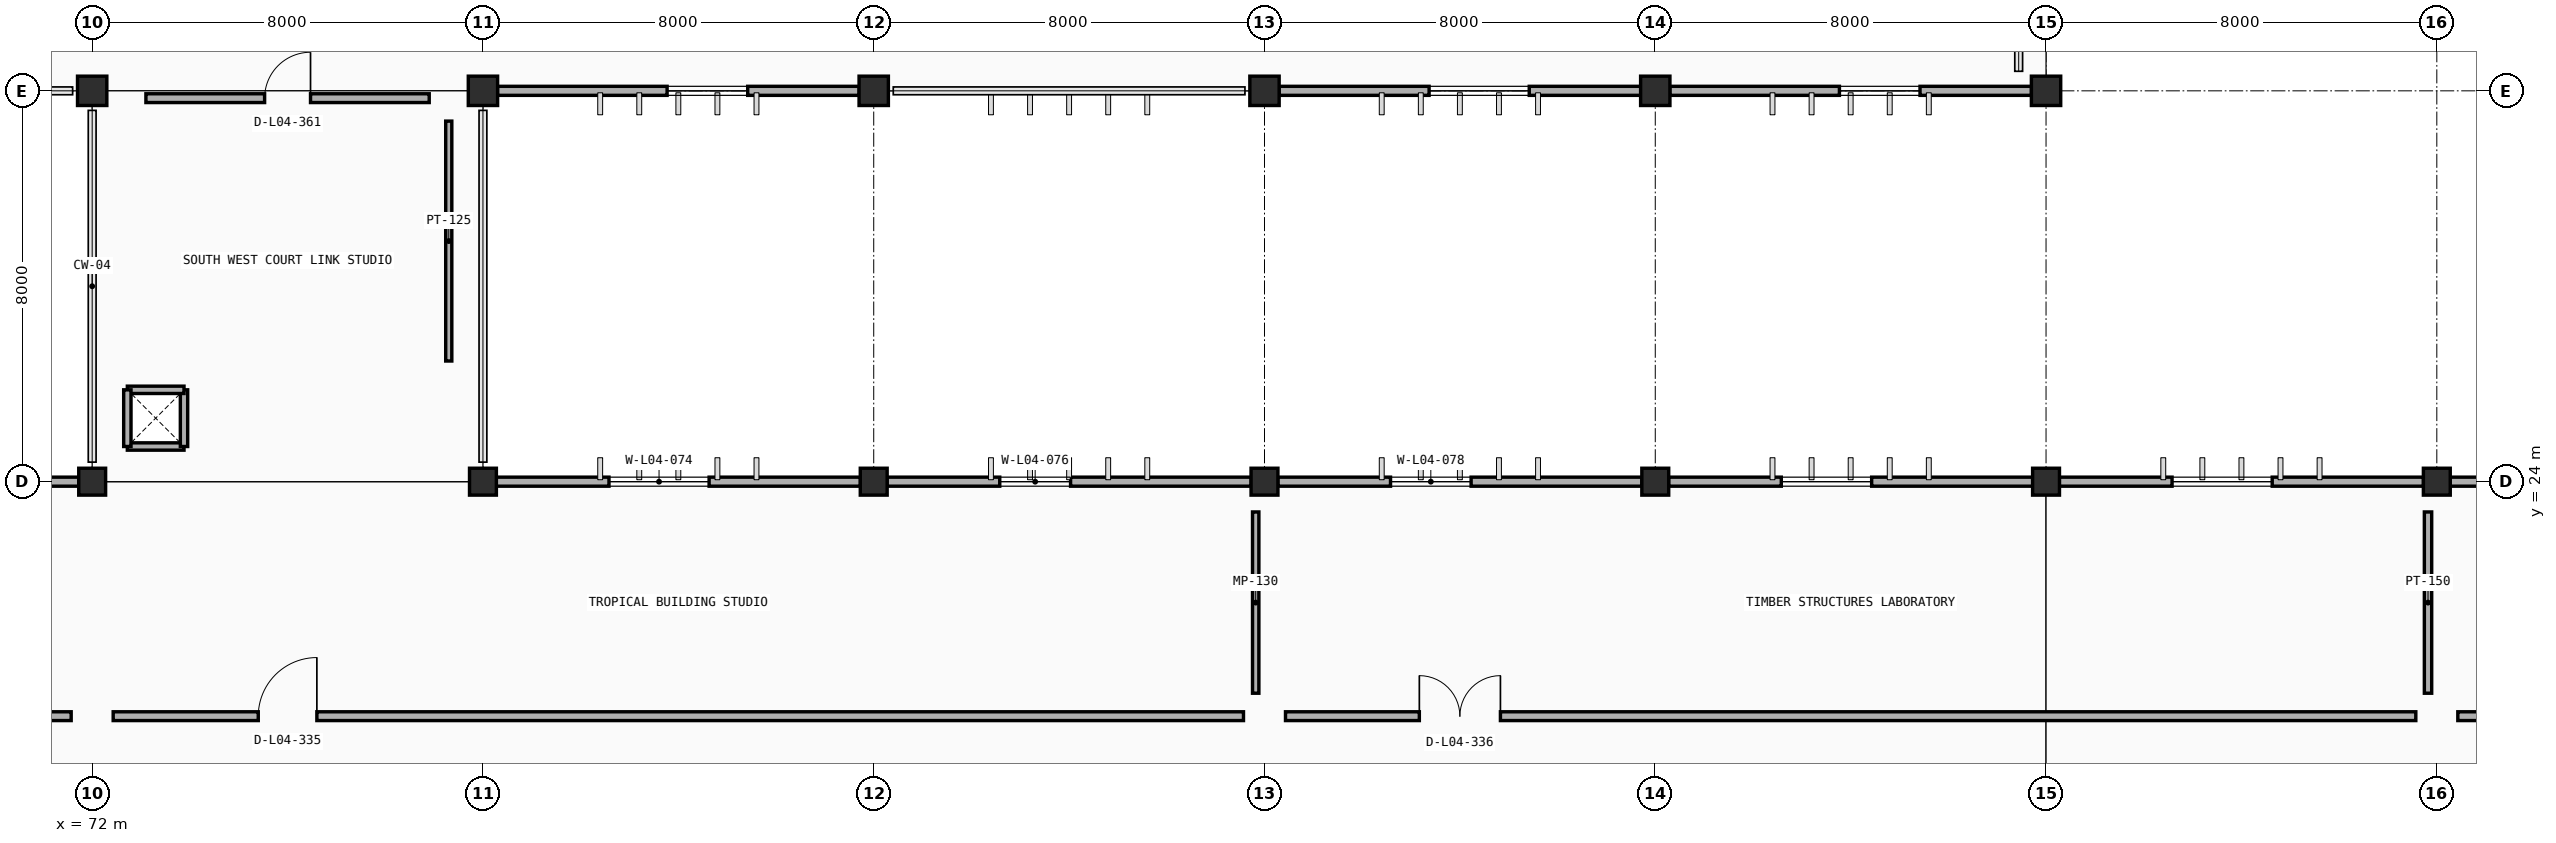
"""IFC4 building model, lengths in metres.
Left out: names, types, materials, properties, quantities, classifications, styles, units other than length and angle.
Written with IfcOpenShell. Run it as: python <this file> out.ifc"""

import sys

from ifc_helpers import new_model, si_unit, direction, frame, frame_2d, origin, origin_2d, place, context, subcontext, project, spatial, rectangle, extrude, element, fill, save


model = new_model("IFC4")
c1 = context("Model", 3, precision=1e-05, world=origin(), true_north=direction((0.0, 1.0)))
c2 = subcontext(c1, "Body", "Model", "MODEL_VIEW")
j1 = project(units=[si_unit("LENGTHUNIT", "METRE"), si_unit("PLANEANGLEUNIT", "RADIAN")], contexts=[c1])
p1 = place(None, origin())
s1 = spatial("IfcSite", under=j1, at=p1, CompositionType="ELEMENT")
p2 = place(p1, origin())
s2 = spatial("IfcBuilding", under=s1, at=p2, CompositionType="ELEMENT")
p3 = place(p2, frame((0.0, 0.0, 13.8)))
s3 = spatial("IfcBuildingStorey", under=s2, at=p3, CompositionType="ELEMENT", Elevation=13.8)
for number, where, z_axis, x_axis in (
    (1, (72.0, 24.0, 0.0), (0.0, 0.0, 1.0), (1.0, 0.0, 0.0)),
    (2, (80.0, 24.0, 0.0), (0.0, 0.0, 1.0), (1.0, 0.0, 0.0)),
    (3, (88.0, 24.0, 0.0), (0.0, 0.0, 1.0), (1.0, 0.0, 0.0)),
    (4, (96.0, 24.0, 0.0), (0.0, 0.0, 1.0), (1.0, 0.0, 0.0)),
    (5, (104.0, 24.0, 0.0), (0.0, 0.0, 1.0), (1.0, 0.0, 0.0)),
    (6, (112.0, 24.0, 0.0), (0.0, 0.0, 1.0), (1.0, 0.0, 0.0)),
    (7, (120.0, 24.0, 0.0), (0.0, 0.0, 1.0), (1.0, 0.0, 0.0)),
):
    element("IfcColumn", number, at=place(p3, frame(where, z_axis=z_axis, x_axis=x_axis)), inside=s3, PredefinedType="COLUMN", context=c2, shape_type="SweptSolid", body=[
        extrude(rectangle(XDim=0.55, YDim=0.55, at=origin_2d()), origin(), (0.0, 0.0, 1.0), 4.2),
    ])
for number, where, z_axis, x_axis in (
    (8, (72.0, 32.0, 0.0), (0.0, 0.0, 1.0), (1.0, 0.0, 0.0)),
    (9, (80.0, 32.0, 0.0), (0.0, 0.0, 1.0), (1.0, 0.0, 0.0)),
    (10, (88.0, 32.0, 0.0), (0.0, 0.0, 1.0), (1.0, 0.0, 0.0)),
    (11, (96.0, 32.0, 0.0), (0.0, 0.0, 1.0), (1.0, 0.0, 0.0)),
    (12, (104.0, 32.0, 0.0), (0.0, 0.0, 1.0), (1.0, 0.0, 0.0)),
    (13, (112.0, 32.0, 0.0), (0.0, 0.0, 1.0), (1.0, 0.0, 0.0)),
):
    element("IfcColumn", number, at=place(p3, frame(where, z_axis=z_axis, x_axis=x_axis)), inside=s3, PredefinedType="COLUMN", context=c2, shape_type="SweptSolid", body=[
        extrude(rectangle(XDim=0.6, YDim=0.6, at=origin_2d()), origin(), (0.0, 0.0, 1.0), 4.2),
    ])
p4 = place(p3, frame((64.272, 24.0, 0.0), z_axis=(0.0, 0.0, 1.0), x_axis=(1.0, 0.0, 0.0)))
e14 = element("IfcWall", 14, at=p4, inside=s3, PredefinedType="STANDARD", context=c2, shape_type="SweptSolid", body=[
    extrude(rectangle(XDim=7.456, YDim=0.185, at=frame_2d((3.728, 0.0))), origin(), (0.0, 0.0, 1.0), 3.325),
])
p5 = place(p4, frame((2.308, 0.0, 0.9)))
e15 = element("IfcOpeningElement", 15, at=p5, cuts=e14, PredefinedType="OPENING", context=c2, shape_type="SweptSolid", body=[
    extrude(rectangle(XDim=1.65, YDim=1.4, at=frame_2d((0.825, 0.7))), frame((0.0, 0.103, 0.0), z_axis=(0.0, -1.0, 0.0), x_axis=(1.0, 0.0, 0.0)), (0.0, 0.0, 1.0), 0.205),
])
p6 = place(p3, frame((80.272, 24.0, 0.0), z_axis=(0.0, 0.0, 1.0), x_axis=(1.0, 0.0, 0.0)))
e16 = element("IfcWall", 16, at=p6, inside=s3, PredefinedType="STANDARD", context=c2, shape_type="SweptSolid", body=[
    extrude(rectangle(XDim=7.456, YDim=0.185, at=frame_2d((3.728, 0.0))), origin(), (0.0, 0.0, 1.0), 3.325),
])
p7 = place(p6, frame((2.308, 0.0, 0.9)))
e17 = element("IfcOpeningElement", 17, at=p7, cuts=e16, PredefinedType="OPENING", context=c2, shape_type="SweptSolid", body=[
    extrude(rectangle(XDim=2.05, YDim=1.4, at=frame_2d((1.025, 0.7))), frame((0.0, 0.103, 0.0), z_axis=(0.0, -1.0, 0.0), x_axis=(1.0, 0.0, 0.0)), (0.0, 0.0, 1.0), 0.205),
])
p8 = place(p3, frame((88.272, 24.0, 0.0), z_axis=(0.0, 0.0, 1.0), x_axis=(1.0, 0.0, 0.0)))
e18 = element("IfcWall", 18, at=p8, inside=s3, PredefinedType="STANDARD", context=c2, shape_type="SweptSolid", body=[
    extrude(rectangle(XDim=7.456, YDim=0.185, at=frame_2d((3.728, 0.0))), origin(), (0.0, 0.0, 1.0), 3.325),
])
p9 = place(p8, frame((2.308, 0.0, 0.9)))
e19 = element("IfcOpeningElement", 19, at=p9, cuts=e18, PredefinedType="OPENING", context=c2, shape_type="SweptSolid", body=[
    extrude(rectangle(XDim=1.45, YDim=1.4, at=frame_2d((0.725, 0.7))), frame((0.0, 0.103, 0.0), z_axis=(0.0, -1.0, 0.0), x_axis=(1.0, 0.0, 0.0)), (0.0, 0.0, 1.0), 0.205),
])
p10 = place(p3, frame((96.272, 24.0, 0.0), z_axis=(0.0, 0.0, 1.0), x_axis=(1.0, 0.0, 0.0)))
e20 = element("IfcWall", 20, at=p10, inside=s3, PredefinedType="STANDARD", context=c2, shape_type="SweptSolid", body=[
    extrude(rectangle(XDim=7.456, YDim=0.185, at=frame_2d((3.728, 0.0))), origin(), (0.0, 0.0, 1.0), 3.325),
])
p11 = place(p10, frame((2.308, 0.0, 0.9)))
e21 = element("IfcOpeningElement", 21, at=p11, cuts=e20, PredefinedType="OPENING", context=c2, shape_type="SweptSolid", body=[
    extrude(rectangle(XDim=1.65, YDim=1.4, at=frame_2d((0.825, 0.7))), frame((0.0, 0.103, 0.0), z_axis=(0.0, -1.0, 0.0), x_axis=(1.0, 0.0, 0.0)), (0.0, 0.0, 1.0), 0.205),
])
p12 = place(p3, frame((104.272, 24.0, 0.0), z_axis=(0.0, 0.0, 1.0), x_axis=(1.0, 0.0, 0.0)))
e22 = element("IfcWall", 22, at=p12, inside=s3, PredefinedType="STANDARD", context=c2, shape_type="SweptSolid", body=[
    extrude(rectangle(XDim=7.456, YDim=0.185, at=frame_2d((3.728, 0.0))), origin(), (0.0, 0.0, 1.0), 3.325),
])
p13 = place(p12, frame((2.308, 0.0, 0.9)))
e23 = element("IfcOpeningElement", 23, at=p13, cuts=e22, PredefinedType="OPENING", context=c2, shape_type="SweptSolid", body=[
    extrude(rectangle(XDim=1.85, YDim=1.4, at=frame_2d((0.925, 0.7))), frame((0.0, 0.103, 0.0), z_axis=(0.0, -1.0, 0.0), x_axis=(1.0, 0.0, 0.0)), (0.0, 0.0, 1.0), 0.205),
])
p14 = place(p3, frame((112.272, 24.0, 0.0), z_axis=(0.0, 0.0, 1.0), x_axis=(1.0, 0.0, 0.0)))
e24 = element("IfcWall", 24, at=p14, inside=s3, PredefinedType="STANDARD", context=c2, shape_type="SweptSolid", body=[
    extrude(rectangle(XDim=7.456, YDim=0.185, at=frame_2d((3.728, 0.0))), origin(), (0.0, 0.0, 1.0), 3.325),
])
p15 = place(p14, frame((2.308, 0.0, 0.9)))
e25 = element("IfcOpeningElement", 25, at=p15, cuts=e24, PredefinedType="OPENING", context=c2, shape_type="SweptSolid", body=[
    extrude(rectangle(XDim=2.05, YDim=1.4, at=frame_2d((1.025, 0.7))), frame((0.0, 0.103, 0.0), z_axis=(0.0, -1.0, 0.0), x_axis=(1.0, 0.0, 0.0)), (0.0, 0.0, 1.0), 0.205),
])
p16 = place(p3, frame((120.272, 24.0, 0.0), z_axis=(0.0, 0.0, 1.0), x_axis=(1.0, 0.0, 0.0)))
e26 = element("IfcWall", 26, at=p16, inside=s3, PredefinedType="STANDARD", context=c2, shape_type="SweptSolid", body=[
    extrude(rectangle(XDim=7.456, YDim=0.185, at=frame_2d((3.728, 0.0))), origin(), (0.0, 0.0, 1.0), 3.325),
])
p17 = place(p16, frame((2.308, 0.0, 0.9)))
e27 = element("IfcOpeningElement", 27, at=p17, cuts=e26, PredefinedType="OPENING", context=c2, shape_type="SweptSolid", body=[
    extrude(rectangle(XDim=1.45, YDim=1.4, at=frame_2d((0.725, 0.7))), frame((0.0, 0.103, 0.0), z_axis=(0.0, -1.0, 0.0), x_axis=(1.0, 0.0, 0.0)), (0.0, 0.0, 1.0), 0.205),
])
p18 = place(p3, frame((87.703, 32.0, 0.0), z_axis=(0.0, 0.0, 1.0), x_axis=(-1.0, 0.0, 0.0)))
e28 = element("IfcWall", 28, at=p18, inside=s3, PredefinedType="STANDARD", context=c2, shape_type="SweptSolid", body=[
    extrude(rectangle(XDim=7.406, YDim=0.185, at=frame_2d((3.703, 0.0))), origin(), (0.0, 0.0, 1.0), 3.325),
])
p19 = place(p18, frame((2.283, 0.0, 0.9)))
e29 = element("IfcOpeningElement", 29, at=p19, cuts=e28, PredefinedType="OPENING", context=c2, shape_type="SweptSolid", body=[
    extrude(rectangle(XDim=1.65, YDim=1.55, at=frame_2d((0.825, 0.775))), frame((0.0, 0.103, 0.0), z_axis=(0.0, -1.0, 0.0), x_axis=(1.0, 0.0, 0.0)), (0.0, 0.0, 1.0), 0.205),
])
p20 = place(p3, frame((103.703, 32.0, 0.0), z_axis=(0.0, 0.0, 1.0), x_axis=(-1.0, 0.0, 0.0)))
e30 = element("IfcWall", 30, at=p20, inside=s3, PredefinedType="STANDARD", context=c2, shape_type="SweptSolid", body=[
    extrude(rectangle(XDim=7.406, YDim=0.185, at=frame_2d((3.703, 0.0))), origin(), (0.0, 0.0, 1.0), 3.325),
])
p21 = place(p20, frame((2.283, 0.0, 0.9)))
e31 = element("IfcOpeningElement", 31, at=p21, cuts=e30, PredefinedType="OPENING", context=c2, shape_type="SweptSolid", body=[
    extrude(rectangle(XDim=2.05, YDim=1.55, at=frame_2d((1.025, 0.775))), frame((0.0, 0.103, 0.0), z_axis=(0.0, -1.0, 0.0), x_axis=(1.0, 0.0, 0.0)), (0.0, 0.0, 1.0), 0.205),
])
p22 = place(p3, frame((111.703, 32.0, 0.0), z_axis=(0.0, 0.0, 1.0), x_axis=(-1.0, 0.0, 0.0)))
e32 = element("IfcWall", 32, at=p22, inside=s3, PredefinedType="STANDARD", context=c2, shape_type="SweptSolid", body=[
    extrude(rectangle(XDim=7.406, YDim=0.185, at=frame_2d((3.703, 0.0))), origin(), (0.0, 0.0, 1.0), 3.325),
])
p23 = place(p22, frame((2.283, 0.0, 0.9)))
e33 = element("IfcOpeningElement", 33, at=p23, cuts=e32, PredefinedType="OPENING", context=c2, shape_type="SweptSolid", body=[
    extrude(rectangle(XDim=1.65, YDim=1.55, at=frame_2d((0.825, 0.775))), frame((0.0, 0.103, 0.0), z_axis=(0.0, -1.0, 0.0), x_axis=(1.0, 0.0, 0.0)), (0.0, 0.0, 1.0), 0.205),
])
p24 = place(p3, frame((111.76, 32.22, 0.0), z_axis=(0.0, 0.0, 1.0), x_axis=(-1.0, 0.0, 0.0)))
e34 = element("IfcWall", 34, at=p24, inside=s3, PredefinedType="PARAPET", context=c2, shape_type="SweptSolid", body=[
    extrude(rectangle(XDim=0.32, YDim=0.2, at=frame_2d((0.16, 0.0))), origin(), (0.0, 0.0, 1.0), 3.35),
])
for number, where, z_axis, x_axis in (
    (35, (72.72, 24.72, 0.0), (0.0, 0.0, 1.0), (1.0, 0.0, 0.0)),
    (36, (73.88, 24.72, 0.0), (0.0, 0.0, 1.0), (0.0, 1.0, 0.0)),
    (37, (73.88, 25.88, 0.0), (0.0, 0.0, 1.0), (-1.0, 0.0, 0.0)),
    (38, (72.72, 25.88, 0.0), (0.0, 0.0, 1.0), (0.0, -1.0, 0.0)),
):
    element("IfcWall", number, at=place(p3, frame(where, z_axis=z_axis, x_axis=x_axis)), inside=s3, PredefinedType="PARTITIONING", context=c2, shape_type="SweptSolid", body=[
        extrude(rectangle(XDim=1.16, YDim=0.15, at=frame_2d((0.58, 0.0))), origin(), (0.0, 0.0, 1.0), 3.9),
    ])
p25 = place(p3, frame((56.43, 19.2, 0.0), z_axis=(0.0, 0.0, 1.0), x_axis=(1.0, 0.0, 0.0)))
e39 = element("IfcWall", 39, at=p25, inside=s3, PredefinedType="PARTITIONING", context=c2, shape_type="SweptSolid", body=[
    extrude(rectangle(XDim=15.14, YDim=0.18, at=frame_2d((7.57, 0.0))), origin(), (0.0, 0.0, 1.0), 3.3),
])
p26 = place(p25, frame((3.0, 0.0, 0.0)))
e40 = element("IfcOpeningElement", 40, at=p26, cuts=e39, PredefinedType="OPENING", context=c2, shape_type="SweptSolid", body=[
    extrude(rectangle(XDim=1.14, YDim=2.15, at=frame_2d((0.57, 1.075))), frame((0.0, 0.1, 0.0), z_axis=(0.0, -1.0, 0.0), x_axis=(1.0, 0.0, 0.0)), (0.0, 0.0, 1.0), 0.2),
])
p27 = place(p3, frame((72.43, 19.2, 0.0), z_axis=(0.0, 0.0, 1.0), x_axis=(1.0, 0.0, 0.0)))
e41 = element("IfcWall", 41, at=p27, inside=s3, PredefinedType="PARTITIONING", context=c2, shape_type="SweptSolid", body=[
    extrude(rectangle(XDim=23.14, YDim=0.18, at=frame_2d((11.57, 0.0))), origin(), (0.0, 0.0, 1.0), 3.3),
])
p28 = place(p27, frame((2.97, 0.0, 0.0)))
e42 = element("IfcOpeningElement", 42, at=p28, cuts=e41, PredefinedType="OPENING", context=c2, shape_type="SweptSolid", body=[
    extrude(rectangle(XDim=1.2, YDim=2.15, at=frame_2d((0.6, 1.075))), frame((0.0, 0.1, 0.0), z_axis=(0.0, -1.0, 0.0), x_axis=(1.0, 0.0, 0.0)), (0.0, 0.0, 1.0), 0.2),
])
p29 = place(p3, frame((95.82, 19.67, 0.0), z_axis=(0.0, 0.0, 1.0), x_axis=(0.0, 1.0, 0.0)))
e43 = element("IfcWall", 43, at=p29, inside=s3, PredefinedType="MOVABLE", context=c2, shape_type="SweptSolid", body=[
    extrude(rectangle(XDim=3.71, YDim=0.13, at=frame_2d((1.855, 0.0))), origin(), (0.0, 0.0, 1.0), 3.225),
])
p30 = place(p3, frame((96.43, 19.2, 0.0), z_axis=(0.0, 0.0, 1.0), x_axis=(1.0, 0.0, 0.0)))
e44 = element("IfcWall", 44, at=p30, inside=s3, PredefinedType="PARTITIONING", context=c2, shape_type="SweptSolid", body=[
    extrude(rectangle(XDim=23.14, YDim=0.18, at=frame_2d((11.57, 0.0))), origin(), (0.0, 0.0, 1.0), 3.3),
])
p31 = place(p30, frame((2.74, 0.0, 0.0)))
e45 = element("IfcOpeningElement", 45, at=p31, cuts=e44, PredefinedType="OPENING", context=c2, shape_type="SweptSolid", body=[
    extrude(rectangle(XDim=1.66, YDim=2.22, at=frame_2d((0.83, 1.11))), frame((0.0, 0.1, 0.0), z_axis=(0.0, -1.0, 0.0), x_axis=(1.0, 0.0, 0.0)), (0.0, 0.0, 1.0), 0.2),
])
p32 = place(p3, frame((119.82, 19.67, 0.0), z_axis=(0.0, 0.0, 1.0), x_axis=(0.0, 1.0, 0.0)))
e46 = element("IfcWall", 46, at=p32, inside=s3, PredefinedType="PARTITIONING", context=c2, shape_type="SweptSolid", body=[
    extrude(rectangle(XDim=3.71, YDim=0.15, at=frame_2d((1.855, 0.0))), origin(), (0.0, 0.0, 1.0), 3.225),
])
p33 = place(p3, frame((120.43, 19.2, 0.0), z_axis=(0.0, 0.0, 1.0), x_axis=(1.0, 0.0, 0.0)))
e47 = element("IfcWall", 47, at=p33, inside=s3, PredefinedType="PARTITIONING", context=c2, shape_type="SweptSolid", body=[
    extrude(rectangle(XDim=23.14, YDim=0.18, at=frame_2d((11.57, 0.0))), origin(), (0.0, 0.0, 1.0), 3.3),
])
p34 = place(p33, frame((2.66, 0.0, 0.0)))
e48 = element("IfcOpeningElement", 48, at=p34, cuts=e47, PredefinedType="OPENING", context=c2, shape_type="SweptSolid", body=[
    extrude(rectangle(XDim=1.82, YDim=2.25, at=frame_2d((0.91, 1.125))), frame((0.0, 0.1, 0.0), z_axis=(0.0, -1.0, 0.0), x_axis=(1.0, 0.0, 0.0)), (0.0, 0.0, 1.0), 0.2),
])
p35 = place(p3, frame((73.1, 31.85, 0.0), z_axis=(0.0, 0.0, 1.0), x_axis=(1.0, 0.0, 0.0)))
e49 = element("IfcWall", 49, at=p35, inside=s3, PredefinedType="PARTITIONING", context=c2, shape_type="SweptSolid", body=[
    extrude(rectangle(XDim=5.8, YDim=0.18, at=frame_2d((2.9, 0.0))), origin(), (0.0, 0.0, 1.0), 3.3),
])
p36 = place(p35, frame((2.43, 0.0, 0.0)))
e50 = element("IfcOpeningElement", 50, at=p36, cuts=e49, PredefinedType="OPENING", context=c2, shape_type="SweptSolid", body=[
    extrude(rectangle(XDim=0.94, YDim=2.1, at=frame_2d((0.47, 1.05))), frame((0.0, 0.1, 0.0), z_axis=(0.0, -1.0, 0.0), x_axis=(1.0, 0.0, 0.0)), (0.0, 0.0, 1.0), 0.2),
])
p37 = place(p3, frame((79.3, 26.47, 0.0), z_axis=(0.0, 0.0, 1.0), x_axis=(0.0, 1.0, 0.0)))
e51 = element("IfcWall", 51, at=p37, inside=s3, PredefinedType="PARTITIONING", context=c2, shape_type="SweptSolid", body=[
    extrude(rectangle(XDim=4.91, YDim=0.125, at=frame_2d((2.455, 0.0))), origin(), (0.0, 0.0, 1.0), 3.3),
])
p38 = place(p7, origin())
e52 = element("IfcWindow", 52, at=p38, inside=s3, PartitioningType="DOUBLE_PANEL_VERTICAL", PredefinedType="WINDOW", context=c2, shape_type="SweptSolid", body=[
    extrude(rectangle(XDim=2.05, YDim=1.4, at=frame_2d((1.025, 0.7))), frame((0.0, 0.03, 0.0), z_axis=(0.0, -1.0, 0.0), x_axis=(1.0, 0.0, 0.0)), (0.0, 0.0, 1.0), 0.06),
])
fill(e17, e52)
p39 = place(p9, origin())
e53 = element("IfcWindow", 53, at=p39, inside=s3, PartitioningType="SINGLE_PANEL", PredefinedType="WINDOW", context=c2, shape_type="SweptSolid", body=[
    extrude(rectangle(XDim=1.45, YDim=1.4, at=frame_2d((0.725, 0.7))), frame((0.0, 0.03, 0.0), z_axis=(0.0, -1.0, 0.0), x_axis=(1.0, 0.0, 0.0)), (0.0, 0.0, 1.0), 0.06),
])
fill(e19, e53)
p40 = place(p11, origin())
e54 = element("IfcWindow", 54, at=p40, inside=s3, PartitioningType="DOUBLE_PANEL_VERTICAL", PredefinedType="WINDOW", context=c2, shape_type="SweptSolid", body=[
    extrude(rectangle(XDim=1.65, YDim=1.4, at=frame_2d((0.825, 0.7))), frame((0.0, 0.03, 0.0), z_axis=(0.0, -1.0, 0.0), x_axis=(1.0, 0.0, 0.0)), (0.0, 0.0, 1.0), 0.06),
])
fill(e21, e54)
p41 = place(p13, origin())
e55 = element("IfcWindow", 55, at=p41, inside=s3, PartitioningType="DOUBLE_PANEL_VERTICAL", PredefinedType="WINDOW", context=c2, shape_type="SweptSolid", body=[
    extrude(rectangle(XDim=1.85, YDim=1.4, at=frame_2d((0.925, 0.7))), frame((0.0, 0.03, 0.0), z_axis=(0.0, -1.0, 0.0), x_axis=(1.0, 0.0, 0.0)), (0.0, 0.0, 1.0), 0.06),
])
fill(e23, e55)
p42 = place(p15, origin())
e56 = element("IfcWindow", 56, at=p42, inside=s3, PartitioningType="DOUBLE_PANEL_VERTICAL", PredefinedType="WINDOW", context=c2, shape_type="SweptSolid", body=[
    extrude(rectangle(XDim=2.05, YDim=1.4, at=frame_2d((1.025, 0.7))), frame((0.0, 0.03, 0.0), z_axis=(0.0, -1.0, 0.0), x_axis=(1.0, 0.0, 0.0)), (0.0, 0.0, 1.0), 0.06),
])
fill(e25, e56)
p43 = place(p19, origin())
e57 = element("IfcWindow", 57, at=p43, inside=s3, PartitioningType="DOUBLE_PANEL_VERTICAL", PredefinedType="WINDOW", context=c2, shape_type="SweptSolid", body=[
    extrude(rectangle(XDim=1.65, YDim=1.55, at=frame_2d((0.825, 0.775))), frame((0.0, 0.03, 0.0), z_axis=(0.0, -1.0, 0.0), x_axis=(1.0, 0.0, 0.0)), (0.0, 0.0, 1.0), 0.06),
])
fill(e29, e57)
p44 = place(p21, origin())
e58 = element("IfcWindow", 58, at=p44, inside=s3, PartitioningType="DOUBLE_PANEL_VERTICAL", PredefinedType="WINDOW", context=c2, shape_type="SweptSolid", body=[
    extrude(rectangle(XDim=2.05, YDim=1.55, at=frame_2d((1.025, 0.775))), frame((0.0, 0.03, 0.0), z_axis=(0.0, -1.0, 0.0), x_axis=(1.0, 0.0, 0.0)), (0.0, 0.0, 1.0), 0.06),
])
fill(e31, e58)
p45 = place(p23, origin())
e59 = element("IfcWindow", 59, at=p45, inside=s3, PartitioningType="DOUBLE_PANEL_VERTICAL", PredefinedType="WINDOW", context=c2, shape_type="SweptSolid", body=[
    extrude(rectangle(XDim=1.65, YDim=1.55, at=frame_2d((0.825, 0.775))), frame((0.0, 0.03, 0.0), z_axis=(0.0, -1.0, 0.0), x_axis=(1.0, 0.0, 0.0)), (0.0, 0.0, 1.0), 0.06),
])
fill(e33, e59)
p46 = place(p28, origin())
e60 = element("IfcDoor", 60, at=p46, inside=s3, OperationType="SINGLE_SWING_RIGHT", PredefinedType="DOOR", context=c2, shape_type="SweptSolid", body=[
    extrude(rectangle(XDim=1.2, YDim=2.15, at=frame_2d((0.6, 1.075))), frame((0.0, 0.025, 0.0), z_axis=(0.0, -1.0, 0.0), x_axis=(1.0, 0.0, 0.0)), (0.0, 0.0, 1.0), 0.05),
])
fill(e42, e60)
p47 = place(p31, origin())
e61 = element("IfcDoor", 61, at=p47, inside=s3, OperationType="DOUBLE_DOOR_SINGLE_SWING", PredefinedType="DOOR", context=c2, shape_type="SweptSolid", body=[
    extrude(rectangle(XDim=1.66, YDim=2.22, at=frame_2d((0.83, 1.11))), frame((0.0, 0.025, 0.0), z_axis=(0.0, -1.0, 0.0), x_axis=(1.0, 0.0, 0.0)), (0.0, 0.0, 1.0), 0.05),
])
fill(e45, e61)
p48 = place(p36, origin())
e62 = element("IfcDoor", 62, at=p48, inside=s3, OperationType="SINGLE_SWING_RIGHT", PredefinedType="DOOR", context=c2, shape_type="SweptSolid", body=[
    extrude(rectangle(XDim=0.94, YDim=2.1, at=frame_2d((0.47, 1.05))), frame((0.0, 0.025, 0.0), z_axis=(0.0, -1.0, 0.0), x_axis=(1.0, 0.0, 0.0)), (0.0, 0.0, 1.0), 0.05),
])
fill(e50, e62)
save(model, sys.argv[1])
